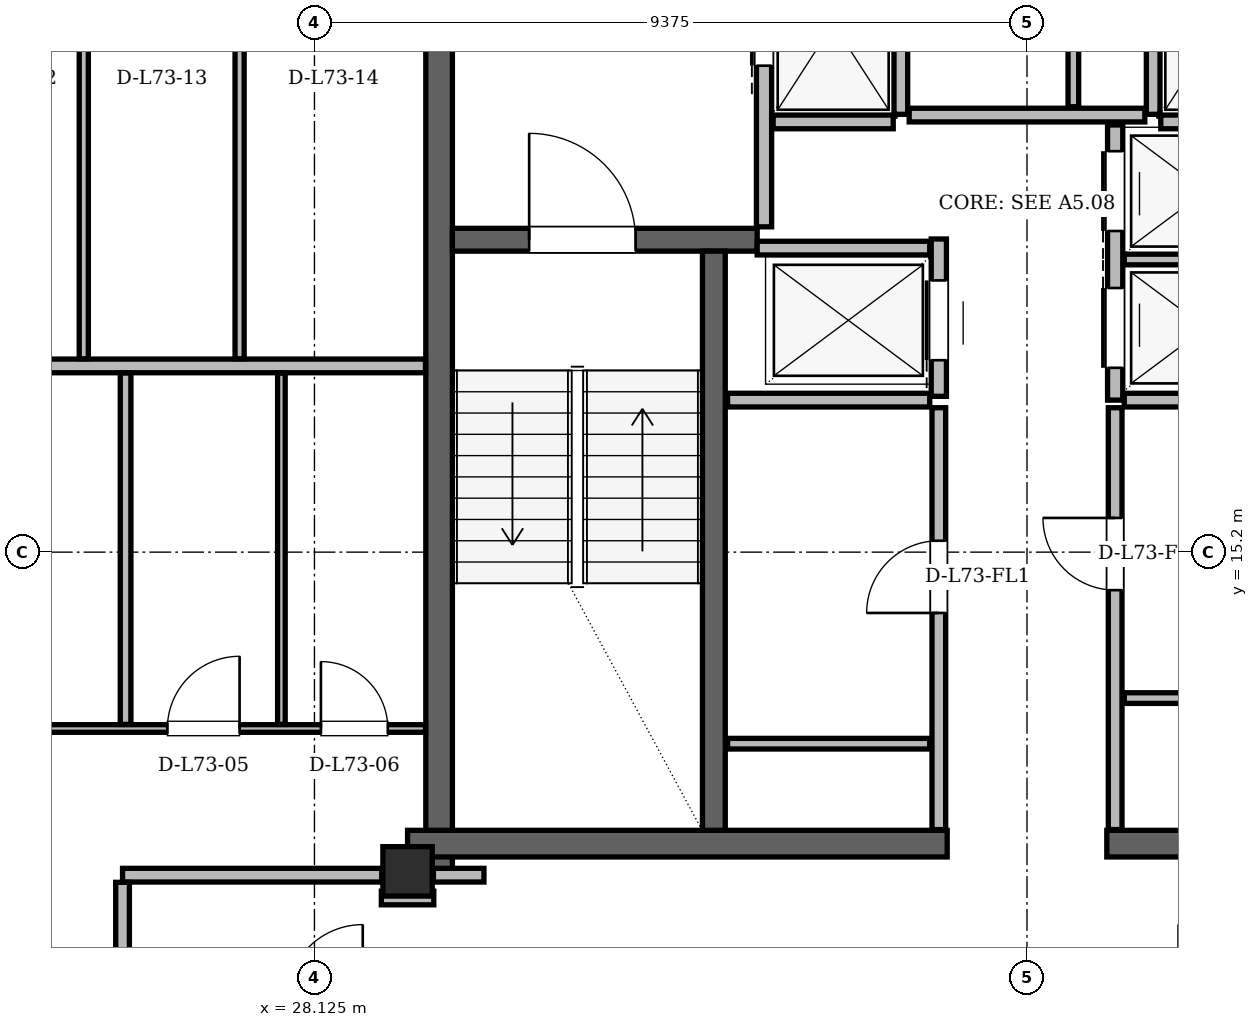
"""IFC4 building model, lengths in metres.
Left out: names, types, materials, properties, quantities, classifications, styles, units other than length and angle.
Written with IfcOpenShell. Run it as: python <this file> out.ifc"""

import sys

from ifc_helpers import new_model, si_unit, direction, frame, frame_2d, origin, origin_2d, place, context, subcontext, project, spatial, rectangle, hollow_rectangle, extrude, element, fill, save


model = new_model("IFC4")
c1 = context("Model", 3, precision=1e-05, world=origin(), true_north=direction((0.0, 1.0)))
c2 = subcontext(c1, "Body", "Model", "MODEL_VIEW")
j1 = project(units=[si_unit("LENGTHUNIT", "METRE"), si_unit("PLANEANGLEUNIT", "RADIAN")], contexts=[c1])
p1 = place(None, origin())
s1 = spatial("IfcSite", under=j1, at=p1, CompositionType="ELEMENT")
p2 = place(p1, origin())
s2 = spatial("IfcBuilding", under=s1, at=p2, CompositionType="ELEMENT")
p3 = place(p2, frame((0.0, 0.0, 277.2)))
s3 = spatial("IfcBuildingStorey", under=s2, at=p3, CompositionType="ELEMENT", Elevation=277.2)
p4 = place(p3, frame((29.35, 11.0, 0.0), z_axis=(0.0, 0.0, 1.0), x_axis=(1.0, 0.0, 0.0)))
e1 = element("IfcColumn", 1, at=p4, inside=s3, PredefinedType="COLUMN", context=c2, shape_type="SweptSolid", body=[
    extrude(hollow_rectangle(XDim=0.65, YDim=0.65, WallThickness=0.05, at=origin_2d()), origin(), (0.0, 0.0, 1.0), 3.9),
])
p5 = place(p3, frame((29.765, 11.0, 0.0), z_axis=(0.0, 0.0, 1.0), x_axis=(0.0, 1.0, 0.0)))
e2 = element("IfcWall", 2, at=p5, inside=s3, PredefinedType="SHEAR", context=c2, shape_type="SweptSolid", body=[
    extrude(rectangle(XDim=13.3, YDim=0.35, at=frame_2d((6.65, 0.0))), origin(), (0.0, 0.0, 1.0), 3.68),
])
for number, where, z_axis, x_axis in (
    (3, (29.35, 11.365, 0.0), (0.0, 0.0, 1.0), (1.0, 0.0, 0.0)),
    (4, (38.55, 11.365, 0.0), (0.0, 0.0, 1.0), (1.0, 0.0, 0.0)),
):
    element("IfcWall", number, at=place(p3, frame(where, z_axis=z_axis, x_axis=x_axis)), inside=s3, PredefinedType="SHEAR", context=c2, shape_type="SweptSolid", body=[
        extrude(rectangle(XDim=7.1, YDim=0.35, at=frame_2d((3.55, 0.0))), origin(), (0.0, 0.0, 1.0), 3.68),
    ])
p6 = place(p3, frame((29.94, 19.31, 0.0), z_axis=(0.0, 0.0, 1.0), x_axis=(1.0, 0.0, 0.0)))
e5 = element("IfcWall", 5, at=p6, inside=s3, PredefinedType="SHEAR", context=c2, shape_type="SweptSolid", body=[
    extrude(rectangle(XDim=4.01, YDim=0.3, at=frame_2d((2.005, 0.0))), origin(), (0.0, 0.0, 1.0), 3.68),
])
p7 = place(p6, frame((1.01, 0.0, 0.0)))
e6 = element("IfcOpeningElement", 6, at=p7, cuts=e5, PredefinedType="OPENING", context=c2, shape_type="SweptSolid", body=[
    extrude(rectangle(XDim=1.4, YDim=2.2, at=frame_2d((0.7, 1.1))), frame((0.0, 0.15, 0.0), z_axis=(0.0, -1.0, 0.0), x_axis=(1.0, 0.0, 0.0)), (0.0, 0.0, 1.0), 0.3),
])
p8 = place(p3, frame((33.38, 11.54, 0.0), z_axis=(0.0, 0.0, 1.0), x_axis=(0.0, 1.0, 0.0)))
e7 = element("IfcWall", 7, at=p8, inside=s3, PredefinedType="SHEAR", context=c2, shape_type="SweptSolid", body=[
    extrude(rectangle(XDim=7.62, YDim=0.3, at=frame_2d((3.81, 0.0))), origin(), (0.0, 0.0, 1.0), 3.68),
])
p9 = place(p3, frame((35.202, 43.013, 0.0), z_axis=(0.0, 0.0, 1.0), x_axis=(-0.499998095684, -0.866026503239, 0.0)))
e8 = element("IfcWall", 8, at=p9, inside=s3, PredefinedType="SOLIDWALL", context=c2, shape_type="SweptSolid", body=[
    extrude(rectangle(XDim=37.389, YDim=0.29, at=frame_2d((18.695, 0.0))), origin(), (0.0, 0.0, 1.0), 3.058),
])
p10 = place(p9, frame((8.034, 0.0, 0.0)))
e9 = element("IfcOpeningElement", 9, at=p10, cuts=e8, PredefinedType="OPENING", context=c2, shape_type="SweptSolid", body=[
    extrude(rectangle(XDim=1.5, YDim=2.2, at=frame_2d((0.75, 1.1))), frame((0.0, 0.145, 0.0), z_axis=(0.0, -1.0, 0.0), x_axis=(1.0, 0.0, 0.0)), (0.0, 0.0, 1.0), 0.29),
])
p11 = place(p9, frame((32.25, 0.0, 0.0)))
e10 = element("IfcOpeningElement", 10, at=p11, cuts=e8, PredefinedType="OPENING", context=c2, shape_type="SweptSolid", body=[
    extrude(rectangle(XDim=1.5, YDim=2.2, at=frame_2d((0.75, 1.1))), frame((0.0, 0.145, 0.0), z_axis=(0.0, -1.0, 0.0), x_axis=(1.0, 0.0, 0.0)), (0.0, 0.0, 1.0), 0.29),
])
p12 = place(p9, frame((35.223, 0.0, 0.85)))
e11 = element("IfcOpeningElement", 11, at=p12, cuts=e8, PredefinedType="OPENING", context=c2, shape_type="SweptSolid", body=[
    extrude(rectangle(XDim=1.2, YDim=1.48, at=frame_2d((0.6, 0.74))), frame((0.0, 0.145, 0.0), z_axis=(0.0, -1.0, 0.0), x_axis=(1.0, 0.0, 0.0)), (0.0, 0.0, 1.0), 0.29),
])
p13 = place(p9, frame((29.461, 0.0, 0.85)))
e12 = element("IfcOpeningElement", 12, at=p13, cuts=e8, PredefinedType="OPENING", context=c2, shape_type="SweptSolid", body=[
    extrude(rectangle(XDim=1.2, YDim=1.48, at=frame_2d((0.6, 0.74))), frame((0.0, 0.145, 0.0), z_axis=(0.0, -1.0, 0.0), x_axis=(1.0, 0.0, 0.0)), (0.0, 0.0, 1.0), 0.29),
])
p14 = place(p9, frame((20.271, 0.0, 0.85)))
e13 = element("IfcOpeningElement", 13, at=p14, cuts=e8, PredefinedType="OPENING", context=c2, shape_type="SweptSolid", body=[
    extrude(rectangle(XDim=1.2, YDim=1.48, at=frame_2d((0.6, 0.74))), frame((0.0, 0.145, 0.0), z_axis=(0.0, -1.0, 0.0), x_axis=(1.0, 0.0, 0.0)), (0.0, 0.0, 1.0), 0.29),
])
p15 = place(p9, frame((22.555, 0.0, 0.85)))
e14 = element("IfcOpeningElement", 14, at=p15, cuts=e8, PredefinedType="OPENING", context=c2, shape_type="SweptSolid", body=[
    extrude(rectangle(XDim=1.2, YDim=1.48, at=frame_2d((0.6, 0.74))), frame((0.0, 0.145, 0.0), z_axis=(0.0, -1.0, 0.0), x_axis=(1.0, 0.0, 0.0)), (0.0, 0.0, 1.0), 0.29),
])
p16 = place(p9, frame((27.315, 0.0, 0.85)))
e15 = element("IfcOpeningElement", 15, at=p16, cuts=e8, PredefinedType="OPENING", context=c2, shape_type="SweptSolid", body=[
    extrude(rectangle(XDim=1.2, YDim=1.48, at=frame_2d((0.6, 0.74))), frame((0.0, 0.145, 0.0), z_axis=(0.0, -1.0, 0.0), x_axis=(1.0, 0.0, 0.0)), (0.0, 0.0, 1.0), 0.29),
])
p17 = place(p9, frame((3.242, 0.0, 0.85)))
e16 = element("IfcOpeningElement", 16, at=p17, cuts=e8, PredefinedType="OPENING", context=c2, shape_type="SweptSolid", body=[
    extrude(rectangle(XDim=1.2, YDim=1.48, at=frame_2d((0.6, 0.74))), frame((0.0, 0.145, 0.0), z_axis=(0.0, -1.0, 0.0), x_axis=(1.0, 0.0, 0.0)), (0.0, 0.0, 1.0), 0.29),
])
p18 = place(p3, frame((34.04, 19.48, 0.0), z_axis=(0.0, 0.0, 1.0), x_axis=(0.0, 1.0, 0.0)))
e17 = element("IfcWall", 17, at=p18, inside=s3, PredefinedType="PARTITIONING", context=c2, shape_type="SweptSolid", body=[
    extrude(rectangle(XDim=4.5, YDim=0.2, at=frame_2d((2.25, 0.0))), origin(), (0.0, 0.0, 1.0), 3.68),
])
p19 = place(p18, frame((2.12, 0.0, 0.0)))
e18 = element("IfcOpeningElement", 18, at=p19, cuts=e17, PredefinedType="OPENING", context=c2, shape_type="SweptSolid", body=[
    extrude(rectangle(XDim=1.1, YDim=2.2, at=frame_2d((0.55, 1.1))), frame((0.0, 0.1, 0.0), z_axis=(0.0, -1.0, 0.0), x_axis=(1.0, 0.0, 0.0)), (0.0, 0.0, 1.0), 0.2),
])
p20 = place(p3, frame((35.84, 20.96, 0.0), z_axis=(0.0, 0.0, 1.0), x_axis=(0.0, 1.0, 0.0)))
e19 = element("IfcWall", 19, at=p20, inside=s3, PredefinedType="PARTITIONING", context=c2, shape_type="SweptSolid", body=[
    extrude(rectangle(XDim=3.02, YDim=0.18, at=frame_2d((1.51, 0.0))), origin(), (0.0, 0.0, 1.0), 3.68),
])
p21 = place(p3, frame((34.16, 20.86, 0.0), z_axis=(0.0, 0.0, 1.0), x_axis=(1.0, 0.0, 0.0)))
e20 = element("IfcWall", 20, at=p21, inside=s3, PredefinedType="PARTITIONING", context=c2, shape_type="SweptSolid", body=[
    extrude(rectangle(XDim=1.58, YDim=0.18, at=frame_2d((0.79, 0.0))), origin(), (0.0, 0.0, 1.0), 3.68),
])
p22 = place(p3, frame((39.16, 20.96, 0.0), z_axis=(0.0, 0.0, 1.0), x_axis=(0.0, 1.0, 0.0)))
e21 = element("IfcWall", 21, at=p22, inside=s3, PredefinedType="PARTITIONING", context=c2, shape_type="SweptSolid", body=[
    extrude(rectangle(XDim=3.02, YDim=0.18, at=frame_2d((1.51, 0.0))), origin(), (0.0, 0.0, 1.0), 3.68),
])
p23 = place(p3, frame((39.26, 20.86, 0.0), z_axis=(0.0, 0.0, 1.0), x_axis=(1.0, 0.0, 0.0)))
e22 = element("IfcWall", 22, at=p23, inside=s3, PredefinedType="PARTITIONING", context=c2, shape_type="SweptSolid", body=[
    extrude(rectangle(XDim=1.58, YDim=0.18, at=frame_2d((0.79, 0.0))), origin(), (0.0, 0.0, 1.0), 3.68),
])
p24 = place(p3, frame((36.34, 17.25, 0.0), z_axis=(0.0, 0.0, 1.0), x_axis=(0.0, 1.0, 0.0)))
e23 = element("IfcWall", 23, at=p24, inside=s3, PredefinedType="PARTITIONING", context=c2, shape_type="SweptSolid", body=[
    extrude(rectangle(XDim=2.07, YDim=0.2, at=frame_2d((1.035, 0.0))), origin(), (0.0, 0.0, 1.0), 3.68),
])
p25 = place(p24, frame((0.475, 0.0, 0.0)))
e24 = element("IfcOpeningElement", 24, at=p25, cuts=e23, PredefinedType="OPENING", context=c2, shape_type="SweptSolid", body=[
    extrude(rectangle(XDim=1.05, YDim=2.15, at=frame_2d((0.525, 1.075))), frame((0.0, 0.1, 0.0), z_axis=(0.0, -1.0, 0.0), x_axis=(1.0, 0.0, 0.0)), (0.0, 0.0, 1.0), 0.2),
])
p26 = place(p3, frame((33.95, 19.2, 0.0), z_axis=(0.0, 0.0, 1.0), x_axis=(1.0, 0.0, 0.0)))
e25 = element("IfcWall", 25, at=p26, inside=s3, PredefinedType="PARTITIONING", context=c2, shape_type="SweptSolid", body=[
    extrude(rectangle(XDim=2.27, YDim=0.18, at=frame_2d((1.135, 0.0))), origin(), (0.0, 0.0, 1.0), 3.68),
])
p27 = place(p3, frame((33.56, 17.2, 0.0), z_axis=(0.0, 0.0, 1.0), x_axis=(1.0, 0.0, 0.0)))
e26 = element("IfcWall", 26, at=p27, inside=s3, PredefinedType="PARTITIONING", context=c2, shape_type="SweptSolid", body=[
    extrude(rectangle(XDim=2.66, YDim=0.18, at=frame_2d((1.33, 0.0))), origin(), (0.0, 0.0, 1.0), 3.68),
])
p28 = place(p3, frame((36.34, 11.55, 0.0), z_axis=(0.0, 0.0, 1.0), x_axis=(0.0, 1.0, 0.0)))
e27 = element("IfcWall", 27, at=p28, inside=s3, PredefinedType="PARTITIONING", context=c2, shape_type="SweptSolid", body=[
    extrude(rectangle(XDim=5.55, YDim=0.18, at=frame_2d((2.775, 0.0))), origin(), (0.0, 0.0, 1.0), 3.68),
])
p29 = place(p28, frame((2.85, 0.0, 0.0)))
e28 = element("IfcOpeningElement", 28, at=p29, cuts=e27, PredefinedType="OPENING", context=c2, shape_type="SweptSolid", body=[
    extrude(rectangle(XDim=0.95, YDim=2.1, at=frame_2d((0.475, 1.05))), frame((0.0, 0.09, 0.0), z_axis=(0.0, -1.0, 0.0), x_axis=(1.0, 0.0, 0.0)), (0.0, 0.0, 1.0), 0.18),
])
p30 = place(p3, frame((33.56, 12.68, 0.0), z_axis=(0.0, 0.0, 1.0), x_axis=(1.0, 0.0, 0.0)))
e29 = element("IfcWall", 29, at=p30, inside=s3, PredefinedType="PARTITIONING", context=c2, shape_type="SweptSolid", body=[
    extrude(rectangle(XDim=2.66, YDim=0.14, at=frame_2d((1.33, 0.0))), origin(), (0.0, 0.0, 1.0), 3.68),
])
p31 = place(p3, frame((38.66, 17.2, 0.0), z_axis=(0.0, 0.0, 1.0), x_axis=(0.0, 1.0, 0.0)))
e30 = element("IfcWall", 30, at=p31, inside=s3, PredefinedType="PARTITIONING", context=c2, shape_type="SweptSolid", body=[
    extrude(rectangle(XDim=3.62, YDim=0.2, at=frame_2d((1.81, 0.0))), origin(), (0.0, 0.0, 1.0), 3.68),
])
p32 = place(p31, frame((0.425, 0.0, 0.0)))
e31 = element("IfcOpeningElement", 31, at=p32, cuts=e30, PredefinedType="OPENING", context=c2, shape_type="SweptSolid", body=[
    extrude(rectangle(XDim=1.05, YDim=2.15, at=frame_2d((0.525, 1.075))), frame((0.0, 0.1, 0.0), z_axis=(0.0, -1.0, 0.0), x_axis=(1.0, 0.0, 0.0)), (0.0, 0.0, 1.0), 0.2),
])
p33 = place(p31, frame((2.225, 0.0, 0.0)))
e32 = element("IfcOpeningElement", 32, at=p33, cuts=e30, PredefinedType="OPENING", context=c2, shape_type="SweptSolid", body=[
    extrude(rectangle(XDim=1.05, YDim=2.15, at=frame_2d((0.525, 1.075))), frame((0.0, 0.1, 0.0), z_axis=(0.0, -1.0, 0.0), x_axis=(1.0, 0.0, 0.0)), (0.0, 0.0, 1.0), 0.2),
])
p34 = place(p3, frame((38.78, 17.2, 0.0), z_axis=(0.0, 0.0, 1.0), x_axis=(1.0, 0.0, 0.0)))
e33 = element("IfcWall", 33, at=p34, inside=s3, PredefinedType="PARTITIONING", context=c2, shape_type="SweptSolid", body=[
    extrude(rectangle(XDim=2.66, YDim=0.18, at=frame_2d((1.33, 0.0))), origin(), (0.0, 0.0, 1.0), 3.68),
])
p35 = place(p3, frame((38.78, 19.05, 0.0), z_axis=(0.0, 0.0, 1.0), x_axis=(1.0, 0.0, 0.0)))
e34 = element("IfcWall", 34, at=p35, inside=s3, PredefinedType="PARTITIONING", context=c2, shape_type="SweptSolid", body=[
    extrude(rectangle(XDim=2.66, YDim=0.14, at=frame_2d((1.33, 0.0))), origin(), (0.0, 0.0, 1.0), 3.68),
])
p36 = place(p3, frame((38.66, 11.55, 0.0), z_axis=(0.0, 0.0, 1.0), x_axis=(0.0, 1.0, 0.0)))
e35 = element("IfcWall", 35, at=p36, inside=s3, PredefinedType="PARTITIONING", context=c2, shape_type="SweptSolid", body=[
    extrude(rectangle(XDim=5.55, YDim=0.18, at=frame_2d((2.775, 0.0))), origin(), (0.0, 0.0, 1.0), 3.68),
])
p37 = place(p36, frame((3.15, 0.0, 0.0)))
e36 = element("IfcOpeningElement", 36, at=p37, cuts=e35, PredefinedType="OPENING", context=c2, shape_type="SweptSolid", body=[
    extrude(rectangle(XDim=0.95, YDim=2.1, at=frame_2d((0.475, 1.05))), frame((0.0, 0.09, 0.0), z_axis=(0.0, -1.0, 0.0), x_axis=(1.0, 0.0, 0.0)), (0.0, 0.0, 1.0), 0.18),
])
p38 = place(p3, frame((38.78, 13.28, 0.0), z_axis=(0.0, 0.0, 1.0), x_axis=(1.0, 0.0, 0.0)))
e37 = element("IfcWall", 37, at=p38, inside=s3, PredefinedType="PARTITIONING", context=c2, shape_type="SweptSolid", body=[
    extrude(rectangle(XDim=2.66, YDim=0.14, at=frame_2d((1.33, 0.0))), origin(), (0.0, 0.0, 1.0), 3.68),
])
p39 = place(p3, frame((35.95, 20.95, 0.0), z_axis=(0.0, 0.0, 1.0), x_axis=(1.0, 0.0, 0.0)))
e38 = element("IfcWall", 38, at=p39, inside=s3, PredefinedType="PARTITIONING", context=c2, shape_type="SweptSolid", body=[
    extrude(rectangle(XDim=3.1, YDim=0.18, at=frame_2d((1.55, 0.0))), origin(), (0.0, 0.0, 1.0), 3.68),
])
p40 = place(p3, frame((38.11, 21.06, 0.0), z_axis=(0.0, 0.0, 1.0), x_axis=(0.0, 1.0, 0.0)))
e39 = element("IfcWall", 39, at=p40, inside=s3, PredefinedType="PARTITIONING", context=c2, shape_type="SweptSolid", body=[
    extrude(rectangle(XDim=2.92, YDim=0.14, at=frame_2d((1.46, 0.0))), origin(), (0.0, 0.0, 1.0), 3.68),
])
p41 = place(p3, frame((29.005, 10.65, 0.0), z_axis=(0.0, 0.0, 1.0), x_axis=(1.0, 0.0, 0.0)))
e40 = element("IfcWall", 40, at=p41, inside=s3, PredefinedType="PARTITIONING", context=c2, shape_type="SweptSolid", body=[
    extrude(rectangle(XDim=0.69, YDim=0.18, at=frame_2d((0.345, 0.0))), origin(), (0.0, 0.0, 1.0), 3.68),
])
p42 = place(p3, frame((25.6, 10.95, 0.0), z_axis=(0.0, 0.0, 1.0), x_axis=(1.0, 0.0, 0.0)))
e41 = element("IfcWall", 41, at=p42, inside=s3, PredefinedType="PARTITIONING", context=c2, shape_type="SweptSolid", body=[
    extrude(rectangle(XDim=3.41, YDim=0.18, at=frame_2d((1.705, 0.0))), origin(), (0.0, 0.0, 1.0), 3.266),
])
p43 = place(p3, frame((29.69, 10.95, 0.0), z_axis=(0.0, 0.0, 1.0), x_axis=(1.0, 0.0, 0.0)))
e42 = element("IfcWall", 42, at=p43, inside=s3, PredefinedType="PARTITIONING", context=c2, shape_type="SweptSolid", body=[
    extrude(rectangle(XDim=0.665, YDim=0.18, at=frame_2d((0.333, 0.0))), origin(), (0.0, 0.0, 1.0), 2.82),
])
p44 = place(p3, frame((17.977, 12.88, 0.0), z_axis=(0.0, 0.0, 1.0), x_axis=(1.0, 0.0, 0.0)))
e43 = element("IfcWall", 43, at=p44, inside=s3, PredefinedType="PARTITIONING", context=c2, shape_type="SweptSolid", body=[
    extrude(rectangle(XDim=11.609, YDim=0.1, at=frame_2d((5.805, 0.0))), origin(), (0.0, 0.0, 1.0), 2.82),
])
p45 = place(p44, frame((3.357, 0.0, 0.0)))
e44 = element("IfcOpeningElement", 44, at=p45, cuts=e43, PredefinedType="OPENING", context=c2, shape_type="SweptSolid", body=[
    extrude(rectangle(XDim=0.92, YDim=2.12, at=frame_2d((0.46, 1.06))), frame((0.0, 0.05, 0.0), z_axis=(0.0, -1.0, 0.0), x_axis=(1.0, 0.0, 0.0)), (0.0, 0.0, 1.0), 0.1),
])
p46 = place(p44, frame((8.213, 0.0, 0.0)))
e45 = element("IfcOpeningElement", 45, at=p46, cuts=e43, PredefinedType="OPENING", context=c2, shape_type="SweptSolid", body=[
    extrude(rectangle(XDim=0.95, YDim=2.1, at=frame_2d((0.475, 1.05))), frame((0.0, 0.05, 0.0), z_axis=(0.0, -1.0, 0.0), x_axis=(1.0, 0.0, 0.0)), (0.0, 0.0, 1.0), 0.1),
])
p47 = place(p44, frame((10.233, 0.0, 0.0)))
e46 = element("IfcOpeningElement", 46, at=p47, cuts=e43, PredefinedType="OPENING", context=c2, shape_type="SweptSolid", body=[
    extrude(rectangle(XDim=0.88, YDim=2.08, at=frame_2d((0.44, 1.04))), frame((0.0, 0.05, 0.0), z_axis=(0.0, -1.0, 0.0), x_axis=(1.0, 0.0, 0.0)), (0.0, 0.0, 1.0), 0.1),
])
p48 = place(p3, frame((20.73, 17.65, 0.0), z_axis=(0.0, 0.0, 1.0), x_axis=(1.0, 0.0, 0.0)))
e47 = element("IfcWall", 47, at=p48, inside=s3, PredefinedType="PARTITIONING", context=c2, shape_type="SweptSolid", body=[
    extrude(rectangle(XDim=8.855, YDim=0.18, at=frame_2d((4.428, 0.0))), origin(), (0.0, 0.0, 1.0), 2.82),
])
p49 = place(p3, frame((25.09, 17.744, 0.0), z_axis=(0.0, 0.0, 1.0), x_axis=(0.0, 1.0, 0.0)))
e48 = element("IfcWall", 48, at=p49, inside=s3, PredefinedType="PARTITIONING", context=c2, shape_type="SweptSolid", body=[
    extrude(rectangle(XDim=4.102, YDim=0.12, at=frame_2d((2.051, 0.0))), origin(), (0.0, 0.0, 1.0), 3.68),
])
p50 = place(p3, frame((25.6, 9.394, 0.0), z_axis=(0.0, 0.0, 1.0), x_axis=(0.0, 1.0, 0.0)))
e49 = element("IfcWall", 49, at=p50, inside=s3, PredefinedType="PARTITIONING", context=c2, shape_type="SweptSolid", body=[
    extrude(rectangle(XDim=1.462, YDim=0.18, at=frame_2d((0.731, 0.0))), origin(), (0.0, 0.0, 1.0), 3.266),
])
p51 = place(p3, frame((25.64, 12.934, 0.0), z_axis=(0.0, 0.0, 1.0), x_axis=(0.0, 1.0, 0.0)))
e50 = element("IfcWall", 50, at=p51, inside=s3, PredefinedType="PARTITIONING", context=c2, shape_type="SweptSolid", body=[
    extrude(rectangle(XDim=4.622, YDim=0.14, at=frame_2d((2.311, 0.0))), origin(), (0.0, 0.0, 1.0), 3.68),
])
p52 = place(p3, frame((27.14, 17.744, 0.0), z_axis=(0.0, 0.0, 1.0), x_axis=(0.0, 1.0, 0.0)))
e51 = element("IfcWall", 51, at=p52, inside=s3, PredefinedType="PARTITIONING", context=c2, shape_type="SweptSolid", body=[
    extrude(rectangle(XDim=4.102, YDim=0.12, at=frame_2d((2.051, 0.0))), origin(), (0.0, 0.0, 1.0), 3.68),
])
p53 = place(p3, frame((27.69, 12.934, 0.0), z_axis=(0.0, 0.0, 1.0), x_axis=(0.0, 1.0, 0.0)))
e52 = element("IfcWall", 52, at=p53, inside=s3, PredefinedType="PARTITIONING", context=c2, shape_type="SweptSolid", body=[
    extrude(rectangle(XDim=4.622, YDim=0.1, at=frame_2d((2.311, 0.0))), origin(), (0.0, 0.0, 1.0), 3.68),
])
p54 = place(p29, origin())
e53 = element("IfcDoor", 53, at=p54, inside=s3, OperationType="SINGLE_SWING_LEFT", PredefinedType="DOOR", context=c2, shape_type="SweptSolid", body=[
    extrude(rectangle(XDim=0.95, YDim=2.1, at=frame_2d((0.475, 1.05))), frame((0.0, 0.025, 0.0), z_axis=(0.0, -1.0, 0.0), x_axis=(1.0, 0.0, 0.0)), (0.0, 0.0, 1.0), 0.05),
])
fill(e28, e53)
p55 = place(p37, origin())
e54 = element("IfcDoor", 54, at=p55, inside=s3, OperationType="SINGLE_SWING_RIGHT", PredefinedType="DOOR", context=c2, shape_type="SweptSolid", body=[
    extrude(rectangle(XDim=0.95, YDim=2.1, at=frame_2d((0.475, 1.05))), frame((0.0, 0.025, 0.0), z_axis=(0.0, -1.0, 0.0), x_axis=(1.0, 0.0, 0.0)), (0.0, 0.0, 1.0), 0.05),
])
fill(e36, e54)
p56 = place(p19, origin())
e55 = element("IfcDoor", 55, at=p56, inside=s3, OperationType="SLIDING_TO_LEFT", PredefinedType="DOOR", context=c2, shape_type="SweptSolid", body=[
    extrude(rectangle(XDim=1.1, YDim=2.2, at=frame_2d((0.55, 1.1))), frame((0.0, 0.025, 0.0), z_axis=(0.0, -1.0, 0.0), x_axis=(1.0, 0.0, 0.0)), (0.0, 0.0, 1.0), 0.05),
])
fill(e18, e55)
p57 = place(p25, origin())
e56 = element("IfcDoor", 56, at=p57, inside=s3, OperationType="SLIDING_TO_LEFT", PredefinedType="DOOR", context=c2, shape_type="SweptSolid", body=[
    extrude(rectangle(XDim=1.05, YDim=2.15, at=frame_2d((0.525, 1.075))), frame((0.0, 0.025, 0.0), z_axis=(0.0, -1.0, 0.0), x_axis=(1.0, 0.0, 0.0)), (0.0, 0.0, 1.0), 0.05),
])
fill(e24, e56)
p58 = place(p32, origin())
e57 = element("IfcDoor", 57, at=p58, inside=s3, OperationType="SLIDING_TO_RIGHT", PredefinedType="DOOR", context=c2, shape_type="SweptSolid", body=[
    extrude(rectangle(XDim=1.05, YDim=2.15, at=frame_2d((0.525, 1.075))), frame((0.0, 0.025, 0.0), z_axis=(0.0, -1.0, 0.0), x_axis=(1.0, 0.0, 0.0)), (0.0, 0.0, 1.0), 0.05),
])
fill(e31, e57)
p59 = place(p33, origin())
e58 = element("IfcDoor", 58, at=p59, inside=s3, OperationType="SLIDING_TO_LEFT", PredefinedType="DOOR", context=c2, shape_type="SweptSolid", body=[
    extrude(rectangle(XDim=1.05, YDim=2.15, at=frame_2d((0.525, 1.075))), frame((0.0, 0.025, 0.0), z_axis=(0.0, -1.0, 0.0), x_axis=(1.0, 0.0, 0.0)), (0.0, 0.0, 1.0), 0.05),
])
fill(e32, e58)
p60 = place(p7, origin())
e59 = element("IfcDoor", 59, at=p60, inside=s3, OperationType="SINGLE_SWING_LEFT", PredefinedType="DOOR", context=c2, shape_type="SweptSolid", body=[
    extrude(rectangle(XDim=1.4, YDim=2.2, at=frame_2d((0.7, 1.1))), frame((0.0, 0.025, 0.0), z_axis=(0.0, -1.0, 0.0), x_axis=(1.0, 0.0, 0.0)), (0.0, 0.0, 1.0), 0.05),
])
fill(e6, e59)
p61 = place(p46, origin())
e60 = element("IfcDoor", 60, at=p61, inside=s3, OperationType="SINGLE_SWING_RIGHT", PredefinedType="DOOR", context=c2, shape_type="SweptSolid", body=[
    extrude(rectangle(XDim=0.95, YDim=2.1, at=frame_2d((0.475, 1.05))), frame((0.0, 0.025, 0.0), z_axis=(0.0, -1.0, 0.0), x_axis=(1.0, 0.0, 0.0)), (0.0, 0.0, 1.0), 0.05),
])
fill(e45, e60)
p62 = place(p47, origin())
e61 = element("IfcDoor", 61, at=p62, inside=s3, OperationType="SINGLE_SWING_LEFT", PredefinedType="DOOR", context=c2, shape_type="SweptSolid", body=[
    extrude(rectangle(XDim=0.88, YDim=2.08, at=frame_2d((0.44, 1.04))), frame((0.0, 0.025, 0.0), z_axis=(0.0, -1.0, 0.0), x_axis=(1.0, 0.0, 0.0)), (0.0, 0.0, 1.0), 0.05),
])
fill(e46, e61)
save(model, sys.argv[1])
